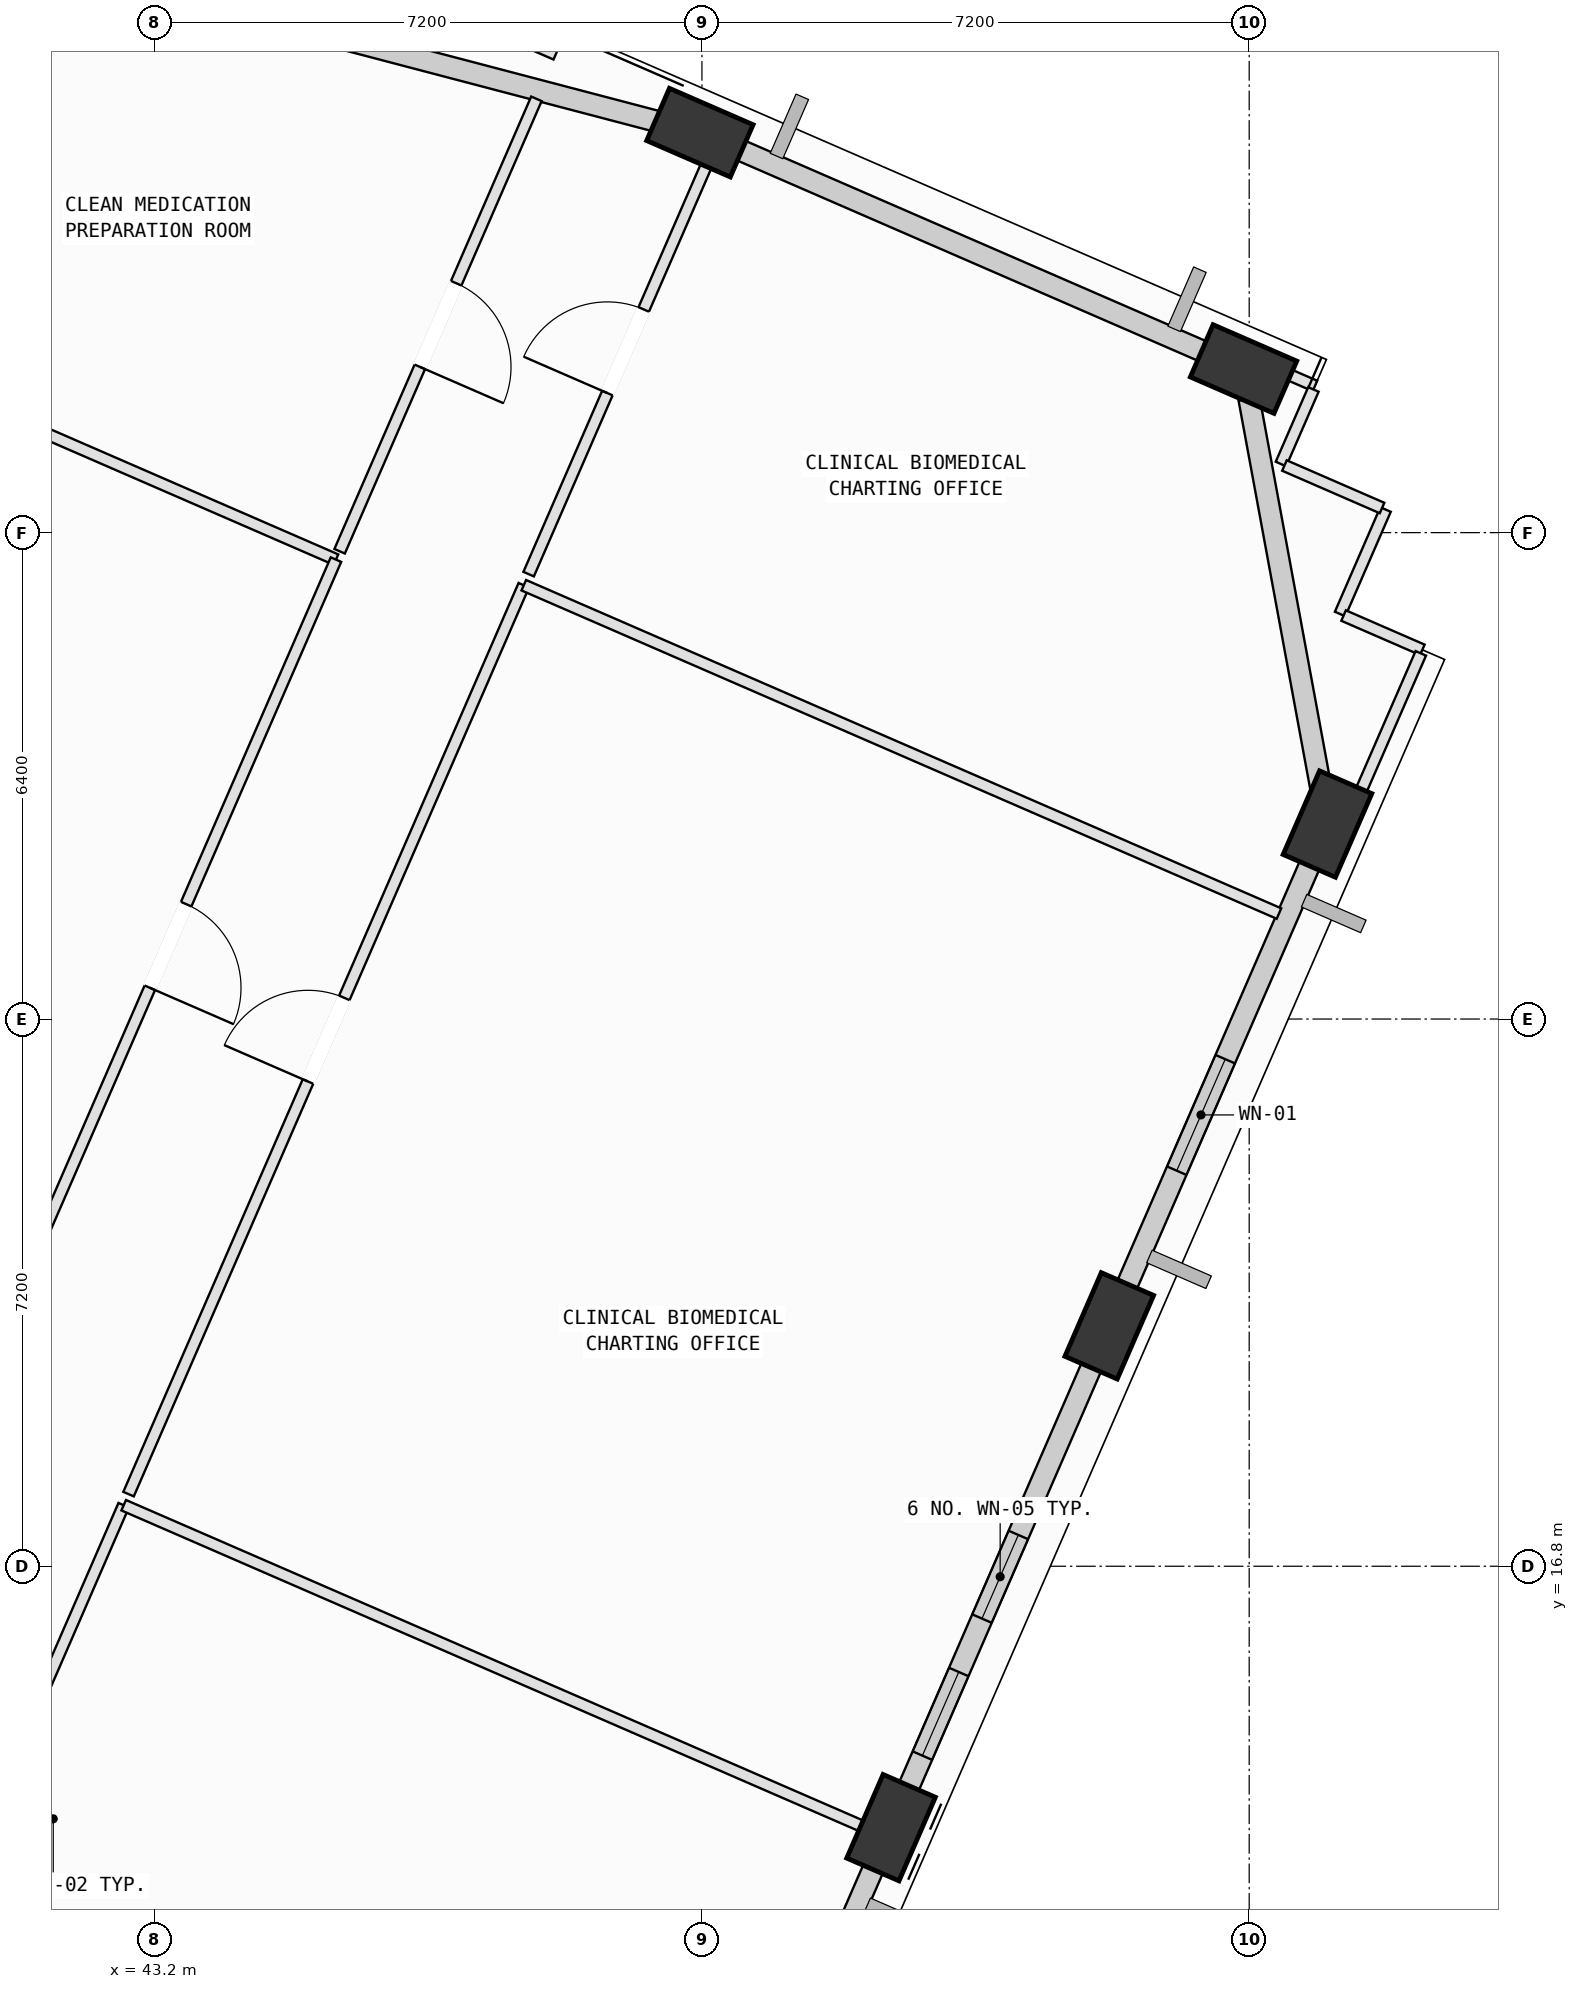
"""IFC4 building model, lengths in metres.
Left out: names, types, materials, properties, quantities, classifications, styles, units other than length and angle.
Written with IfcOpenShell. Run it as: python <this file> out.ifc"""

import sys

from ifc_helpers import new_model, si_unit, direction, frame, frame_2d, origin, origin_2d, place, context, subcontext, project, spatial, rectangle, extrude, element, fill, save


model = new_model("IFC4")
c1 = context("Model", 3, precision=1e-05, world=origin(), true_north=direction((0.0, 1.0)))
c2 = subcontext(c1, "Body", "Model", "MODEL_VIEW")
j1 = project(units=[si_unit("LENGTHUNIT", "METRE"), si_unit("PLANEANGLEUNIT", "RADIAN")], contexts=[c1])
p1 = place(None, origin())
s1 = spatial("IfcSite", under=j1, at=p1, CompositionType="ELEMENT")
p2 = place(p1, origin())
s2 = spatial("IfcBuilding", under=s1, at=p2, CompositionType="ELEMENT")
p3 = place(p2, frame((0.0, 0.0, 312.6)))
s3 = spatial("IfcBuildingStorey", under=s2, at=p3, CompositionType="ELEMENT", Elevation=312.6)
for number, where, z_axis, x_axis in (
    (1, (52.888, 13.36, 0.002), (0.0, 0.0, 1.0), (0.399, 0.917, 0.0)),
    (2, (55.759, 19.963, 0.002), (0.0, 0.0, 1.0), (0.399, 0.917, 0.0)),
    (3, (58.63, 26.566, 0.002), (0.0, 0.0, 1.0), (0.399, 0.917, 0.0)),
    (4, (57.526, 32.553, 0.002), (0.0, 0.0, 1.0), (-0.917, 0.399, 0.0)),
    (5, (50.373, 35.663, 0.002), (0.0, 0.0, 1.0), (-0.917, 0.399, 0.0)),
):
    element("IfcColumn", number, at=place(p3, frame(where, z_axis=z_axis, x_axis=x_axis)), inside=s3, PredefinedType="COLUMN", context=c2, shape_type="SweptSolid", body=[
        extrude(rectangle(XDim=1.2, YDim=0.75, at=origin_2d()), origin(), (0.0, 0.0, 1.0), 3.996),
    ])
p4 = place(p3, frame((52.729, 12.996, 0.0), z_axis=(0.0, 0.0, 1.0), x_axis=(-0.398744230651, -0.917062178112, 0.0)))
e6 = element("IfcWall", 6, at=p4, inside=s3, PredefinedType="SOLIDWALL", context=c2, shape_type="SweptSolid", body=[
    extrude(rectangle(XDim=6.405, YDim=0.28, at=frame_2d((3.203, 0.0))), origin(), (0.0, 0.0, 1.0), 3.265),
])
p5 = place(p4, frame((2.302, 0.0, 0.75)))
e7 = element("IfcOpeningElement", 7, at=p5, cuts=e6, PredefinedType="OPENING", context=c2, shape_type="SweptSolid", body=[
    extrude(rectangle(XDim=1.8, YDim=2.05, at=frame_2d((0.9, 1.025))), frame((0.0, 0.15, 0.0), z_axis=(0.0, -1.0, 0.0), x_axis=(1.0, 0.0, 0.0)), (0.0, 0.0, 1.0), 0.3),
])
p6 = place(p3, frame((55.601, 19.598, 0.0), z_axis=(0.0, 0.0, 1.0), x_axis=(-0.398744230651, -0.917062178112, 0.0)))
e8 = element("IfcWall", 8, at=p6, inside=s3, PredefinedType="SOLIDWALL", context=c2, shape_type="SweptSolid", body=[
    extrude(rectangle(XDim=6.405, YDim=0.28, at=frame_2d((3.203, 0.0))), origin(), (0.0, 0.0, 1.0), 3.265),
])
p7 = place(p6, frame((2.602, 0.0, 0.75)))
e9 = element("IfcOpeningElement", 9, at=p7, cuts=e8, PredefinedType="OPENING", context=c2, shape_type="SweptSolid", body=[
    extrude(rectangle(XDim=1.2, YDim=1.75, at=frame_2d((0.6, 0.875))), frame((0.0, 0.15, 0.0), z_axis=(0.0, -1.0, 0.0), x_axis=(1.0, 0.0, 0.0)), (0.0, 0.0, 1.0), 0.3),
])
p8 = place(p6, frame((4.569, 0.0, 0.75)))
e10 = element("IfcOpeningElement", 10, at=p8, cuts=e8, PredefinedType="OPENING", context=c2, shape_type="SweptSolid", body=[
    extrude(rectangle(XDim=1.2, YDim=1.75, at=frame_2d((0.6, 0.875))), frame((0.0, 0.15, 0.0), z_axis=(0.0, -1.0, 0.0), x_axis=(1.0, 0.0, 0.0)), (0.0, 0.0, 1.0), 0.3),
])
p9 = place(p3, frame((58.472, 26.201, 0.0), z_axis=(0.0, 0.0, 1.0), x_axis=(-0.398776286617, -0.917048239316, 0.0)))
e11 = element("IfcWall", 11, at=p9, inside=s3, PredefinedType="SOLIDWALL", context=c2, shape_type="SweptSolid", body=[
    extrude(rectangle(XDim=6.405, YDim=0.28, at=frame_2d((3.203, 0.0))), origin(), (0.0, 0.0, 1.0), 3.265),
])
p10 = place(p9, frame((2.976, 0.0, 0.75)))
e12 = element("IfcOpeningElement", 12, at=p10, cuts=e11, PredefinedType="OPENING", context=c2, shape_type="SweptSolid", body=[
    extrude(rectangle(XDim=1.6, YDim=1.95, at=frame_2d((0.8, 0.975))), frame((0.0, 0.15, 0.0), z_axis=(0.0, -1.0, 0.0), x_axis=(1.0, 0.0, 0.0)), (0.0, 0.0, 1.0), 0.3),
])
p11 = place(p3, frame((57.598, 32.162, 0.0), z_axis=(0.0, 0.0, 1.0), x_axis=(0.181421889976, -0.983405357845, 0.0)))
e13 = element("IfcWall", 13, at=p11, inside=s3, PredefinedType="SOLIDWALL", context=c2, shape_type="SweptSolid", body=[
    extrude(rectangle(XDim=5.293, YDim=0.28, at=frame_2d((2.646, 0.0))), origin(), (0.0, 0.0, 1.0), 3.265),
])
p12 = place(p3, frame((50.737, 35.504, 0.0), z_axis=(0.0, 0.0, 1.0), x_axis=(0.917057311373, -0.398755423359, 0.0)))
e14 = element("IfcWall", 14, at=p12, inside=s3, PredefinedType="SOLIDWALL", context=c2, shape_type="SweptSolid", body=[
    extrude(rectangle(XDim=7.005, YDim=0.28, at=frame_2d((3.502, 0.0))), origin(), (0.0, 0.0, 1.0), 3.265),
])
p13 = place(p3, frame((41.264, 38.054, 0.0), z_axis=(0.0, 0.0, 1.0), x_axis=(0.967228971308, -0.253905724755, 0.0)))
e15 = element("IfcWall", 15, at=p13, inside=s3, PredefinedType="SOLIDWALL", context=c2, shape_type="SweptSolid", body=[
    extrude(rectangle(XDim=9.02, YDim=0.28, at=frame_2d((4.51, 0.0))), origin(), (0.0, 0.0, 1.0), 3.265),
])
p14 = place(p3, frame((39.48, 9.984, 0.0), z_axis=(0.0, 0.0, 1.0), x_axis=(0.398659488131, 0.917099020021, 0.0)))
e16 = element("IfcWall", 16, at=p14, inside=s3, PredefinedType="PARTITIONING", context=c2, shape_type="SweptSolid", body=[
    extrude(rectangle(XDim=8.308, YDim=0.15, at=frame_2d((4.154, 0.0))), origin(), (0.0, 0.0, 1.0), 3.78),
])
p15 = place(p14, frame((3.554, 0.0, 0.0)))
e17 = element("IfcOpeningElement", 17, at=p15, cuts=e16, PredefinedType="OPENING", context=c2, shape_type="SweptSolid", body=[
    extrude(rectangle(XDim=1.2, YDim=2.15, at=frame_2d((0.6, 1.075))), frame((0.0, 0.085, 0.0), z_axis=(0.0, -1.0, 0.0), x_axis=(1.0, 0.0, 0.0)), (0.0, 0.0, 1.0), 0.17),
])
p16 = place(p3, frame((42.792, 17.603, 0.0), z_axis=(0.0, 0.0, 1.0), x_axis=(0.917063112739, -0.398742081117, 0.0)))
e18 = element("IfcWall", 18, at=p16, inside=s3, PredefinedType="PARTITIONING", context=c2, shape_type="SweptSolid", body=[
    extrude(rectangle(XDim=11.18, YDim=0.15, at=frame_2d((5.59, 0.0))), origin(), (0.0, 0.0, 1.0), 3.78),
])
p17 = place(p3, frame((42.856, 17.749, 0.0), z_axis=(0.0, 0.0, 1.0), x_axis=(0.398751440491, 0.917059043195, 0.0)))
e19 = element("IfcWall", 19, at=p17, inside=s3, PredefinedType="PARTITIONING", context=c2, shape_type="SweptSolid", body=[
    extrude(rectangle(XDim=13.041, YDim=0.15, at=frame_2d((6.52, 0.0))), origin(), (0.0, 0.0, 1.0), 3.78),
])
p18 = place(p17, frame((5.92, 0.0, 0.0)))
e20 = element("IfcOpeningElement", 20, at=p18, cuts=e19, PredefinedType="OPENING", context=c2, shape_type="SweptSolid", body=[
    extrude(rectangle(XDim=1.2, YDim=2.15, at=frame_2d((0.6, 1.075))), frame((0.0, 0.085, 0.0), z_axis=(0.0, -1.0, 0.0), x_axis=(1.0, 0.0, 0.0)), (0.0, 0.0, 1.0), 0.17),
])
p19 = place(p3, frame((48.056, 29.708, 0.0), z_axis=(0.0, 0.0, 1.0), x_axis=(0.917068265028, -0.398730231207, 0.0)))
e21 = element("IfcWall", 21, at=p19, inside=s3, PredefinedType="PARTITIONING", context=c2, shape_type="SweptSolid", body=[
    extrude(rectangle(XDim=10.834, YDim=0.15, at=frame_2d((5.417, 0.0))), origin(), (0.0, 0.0, 1.0), 3.78),
])
p20 = place(p3, frame((56.129, 20.236, 0.0), z_axis=(0.0, 0.0, 1.0), x_axis=(-0.398658726612, -0.91709935105, 0.0)))
e22 = element("IfcWall", 22, at=p20, inside=s3, PredefinedType="PARTITIONING", context=c2, shape_type="SweptSolid", body=[
    extrude(rectangle(XDim=0.795, YDim=0.15, at=frame_2d((0.397, 0.0))), origin(), (0.0, 0.0, 1.0), 3.265),
])
p21 = place(p3, frame((59.394, 30.704, 0.0), z_axis=(0.0, 0.0, 1.0), x_axis=(-0.398904712107, -0.916992383097, 0.0)))
e23 = element("IfcWall", 23, at=p21, inside=s3, PredefinedType="PARTITIONING", context=c2, shape_type="SweptSolid", body=[
    extrude(rectangle(XDim=1.5, YDim=0.15, at=frame_2d((0.75, 0.0))), origin(), (0.0, 0.0, 1.0), 3.78),
])
p22 = place(p3, frame((58.842, 29.309, 0.0), z_axis=(0.0, 0.0, 1.0), x_axis=(0.916815661373, -0.399310709926, 0.0)))
e24 = element("IfcWall", 24, at=p22, inside=s3, PredefinedType="PARTITIONING", context=c2, shape_type="SweptSolid", body=[
    extrude(rectangle(XDim=1.13, YDim=0.15, at=frame_2d((0.565, 0.0))), origin(), (0.0, 0.0, 1.0), 3.78),
])
p23 = place(p3, frame((59.858, 28.812, 0.0), z_axis=(0.0, 0.0, 1.0), x_axis=(-0.399092651862, -0.916910603728, 0.0)))
e25 = element("IfcWall", 25, at=p23, inside=s3, PredefinedType="PARTITIONING", context=c2, shape_type="SweptSolid", body=[
    extrude(rectangle(XDim=2.947, YDim=0.15, at=frame_2d((1.473, 0.0))), origin(), (0.0, 0.0, 1.0), 3.265),
])
p24 = place(p3, frame((48.12, 29.854, 0.0), z_axis=(0.0, 0.0, 1.0), x_axis=(0.398700984872, 0.917080980428, 0.0)))
e26 = element("IfcWall", 26, at=p24, inside=s3, PredefinedType="PARTITIONING", context=c2, shape_type="SweptSolid", body=[
    extrude(rectangle(XDim=6.395, YDim=0.15, at=frame_2d((3.198, 0.0))), origin(), (0.0, 0.0, 1.0), 2.765),
])
p25 = place(p24, frame((2.598, 0.0, 0.0)))
e27 = element("IfcOpeningElement", 27, at=p25, cuts=e26, PredefinedType="OPENING", context=c2, shape_type="SweptSolid", body=[
    extrude(rectangle(XDim=1.2, YDim=2.15, at=frame_2d((0.6, 1.075))), frame((0.0, 0.085, 0.0), z_axis=(0.0, -1.0, 0.0), x_axis=(1.0, 0.0, 0.0)), (0.0, 0.0, 1.0), 0.17),
])
p26 = place(p3, frame((57.229, 32.867, 0.0), z_axis=(0.0, 0.0, 1.0), x_axis=(0.917222637379, -0.398374991032, 0.0)))
e28 = element("IfcWall", 28, at=p26, inside=s3, PredefinedType="PARTITIONING", context=c2, shape_type="SweptSolid", body=[
    extrude(rectangle(XDim=1.348, YDim=0.15, at=frame_2d((0.674, 0.0))), origin(), (0.0, 0.0, 1.0), 3.265),
])
p27 = place(p3, frame((58.445, 32.284, 0.0), z_axis=(0.0, 0.0, 1.0), x_axis=(-0.39911825621, -0.916899458807, 0.0)))
e29 = element("IfcWall", 29, at=p27, inside=s3, PredefinedType="PARTITIONING", context=c2, shape_type="SweptSolid", body=[
    extrude(rectangle(XDim=1.07, YDim=0.15, at=frame_2d((0.535, 0.0))), origin(), (0.0, 0.0, 1.0), 3.78),
])
p28 = place(p3, frame((58.064, 31.283, 0.0), z_axis=(0.0, 0.0, 1.0), x_axis=(0.91691198731, -0.399089473085, 0.0)))
e30 = element("IfcWall", 30, at=p28, inside=s3, PredefinedType="PARTITIONING", context=c2, shape_type="SweptSolid", body=[
    extrude(rectangle(XDim=1.4, YDim=0.15, at=frame_2d((0.7, 0.0))), origin(), (0.0, 0.0, 1.0), 3.78),
])
p29 = place(p3, frame((38.767, 33.01, 0.0), z_axis=(0.0, 0.0, 1.0), x_axis=(0.917030896956, -0.398816165707, 0.0)))
e31 = element("IfcWall", 31, at=p29, inside=s3, PredefinedType="PARTITIONING", context=c2, shape_type="SweptSolid", body=[
    extrude(rectangle(XDim=7.435, YDim=0.15, at=frame_2d((3.717, 0.0))), origin(), (0.0, 0.0, 1.0), 3.78),
])
p30 = place(p3, frame((45.585, 30.045, 0.0), z_axis=(0.0, 0.0, 1.0), x_axis=(-0.398687458661, -0.91708686083, 0.0)))
e32 = element("IfcWall", 32, at=p30, inside=s3, PredefinedType="PARTITIONING", context=c2, shape_type="SweptSolid", body=[
    extrude(rectangle(XDim=11.086, YDim=0.15, at=frame_2d((5.543, 0.0))), origin(), (0.0, 0.0, 1.0), 2.765),
])
p31 = place(p30, frame((4.943, 0.0, 0.0)))
e33 = element("IfcOpeningElement", 33, at=p31, cuts=e32, PredefinedType="OPENING", context=c2, shape_type="SweptSolid", body=[
    extrude(rectangle(XDim=1.2, YDim=2.15, at=frame_2d((0.6, 1.075))), frame((0.0, 0.085, 0.0), z_axis=(0.0, -1.0, 0.0), x_axis=(1.0, 0.0, 0.0)), (0.0, 0.0, 1.0), 0.17),
])
p32 = place(p3, frame((42.424, 39.326, 0.0), z_axis=(0.0, 0.0, 1.0), x_axis=(0.917064175576, -0.3987396367, 0.0)))
e34 = element("IfcWall", 34, at=p32, inside=s3, PredefinedType="PARTITIONING", context=c2, shape_type="SweptSolid", body=[
    extrude(rectangle(XDim=6.6, YDim=0.15, at=frame_2d((3.3, 0.0))), origin(), (0.0, 0.0, 1.0), 3.78),
])
p33 = place(p3, frame((48.222, 36.108, 0.0), z_axis=(0.0, 0.0, 1.0), x_axis=(-0.398811373886, -0.9170329809, 0.0)))
e35 = element("IfcWall", 35, at=p33, inside=s3, PredefinedType="PARTITIONING", context=c2, shape_type="SweptSolid", body=[
    extrude(rectangle(XDim=6.491, YDim=0.15, at=frame_2d((3.246, 0.0))), origin(), (0.0, 0.0, 1.0), 2.765),
])
p34 = place(p33, frame((2.646, 0.0, 0.0)))
e36 = element("IfcOpeningElement", 36, at=p34, cuts=e35, PredefinedType="OPENING", context=c2, shape_type="SweptSolid", body=[
    extrude(rectangle(XDim=1.2, YDim=2.15, at=frame_2d((0.6, 1.075))), frame((0.0, 0.085, 0.0), z_axis=(0.0, -1.0, 0.0), x_axis=(1.0, 0.0, 0.0)), (0.0, 0.0, 1.0), 0.17),
])
p35 = place(p7, origin())
e37 = element("IfcWindow", 37, at=p35, inside=s3, PartitioningType="SINGLE_PANEL", PredefinedType="WINDOW", context=c2, shape_type="SweptSolid", body=[
    extrude(rectangle(XDim=1.2, YDim=1.75, at=frame_2d((0.6, 0.875))), frame((0.0, 0.03, 0.0), z_axis=(0.0, -1.0, 0.0), x_axis=(1.0, 0.0, 0.0)), (0.0, 0.0, 1.0), 0.06),
])
fill(e9, e37)
p36 = place(p8, origin())
e38 = element("IfcWindow", 38, at=p36, inside=s3, PartitioningType="SINGLE_PANEL", PredefinedType="WINDOW", context=c2, shape_type="SweptSolid", body=[
    extrude(rectangle(XDim=1.2, YDim=1.75, at=frame_2d((0.6, 0.875))), frame((0.0, 0.03, 0.0), z_axis=(0.0, -1.0, 0.0), x_axis=(1.0, 0.0, 0.0)), (0.0, 0.0, 1.0), 0.06),
])
fill(e10, e38)
p37 = place(p10, origin())
e39 = element("IfcWindow", 39, at=p37, inside=s3, PartitioningType="SINGLE_PANEL", PredefinedType="WINDOW", context=c2, shape_type="SweptSolid", body=[
    extrude(rectangle(XDim=1.6, YDim=1.95, at=frame_2d((0.8, 0.975))), frame((0.0, 0.03, 0.0), z_axis=(0.0, -1.0, 0.0), x_axis=(1.0, 0.0, 0.0)), (0.0, 0.0, 1.0), 0.06),
])
fill(e12, e39)
p38 = place(p18, origin())
e40 = element("IfcDoor", 40, at=p38, inside=s3, OperationType="SINGLE_SWING_LEFT", PredefinedType="DOOR", context=c2, shape_type="SweptSolid", body=[
    extrude(rectangle(XDim=1.2, YDim=2.15, at=frame_2d((0.6, 1.075))), frame((0.0, 0.025, 0.0), z_axis=(0.0, -1.0, 0.0), x_axis=(1.0, 0.0, 0.0)), (0.0, 0.0, 1.0), 0.05),
])
fill(e20, e40)
p39 = place(p25, origin())
e41 = element("IfcDoor", 41, at=p39, inside=s3, OperationType="SINGLE_SWING_LEFT", PredefinedType="DOOR", context=c2, shape_type="SweptSolid", body=[
    extrude(rectangle(XDim=1.2, YDim=2.15, at=frame_2d((0.6, 1.075))), frame((0.0, 0.025, 0.0), z_axis=(0.0, -1.0, 0.0), x_axis=(1.0, 0.0, 0.0)), (0.0, 0.0, 1.0), 0.05),
])
fill(e27, e41)
p40 = place(p31, origin())
e42 = element("IfcDoor", 42, at=p40, inside=s3, OperationType="SINGLE_SWING_RIGHT", PredefinedType="DOOR", context=c2, shape_type="SweptSolid", body=[
    extrude(rectangle(XDim=1.2, YDim=2.15, at=frame_2d((0.6, 1.075))), frame((0.0, 0.025, 0.0), z_axis=(0.0, -1.0, 0.0), x_axis=(1.0, 0.0, 0.0)), (0.0, 0.0, 1.0), 0.05),
])
fill(e33, e42)
p41 = place(p34, origin())
e43 = element("IfcDoor", 43, at=p41, inside=s3, OperationType="SINGLE_SWING_RIGHT", PredefinedType="DOOR", context=c2, shape_type="SweptSolid", body=[
    extrude(rectangle(XDim=1.2, YDim=2.15, at=frame_2d((0.6, 1.075))), frame((0.0, 0.025, 0.0), z_axis=(0.0, -1.0, 0.0), x_axis=(1.0, 0.0, 0.0)), (0.0, 0.0, 1.0), 0.05),
])
fill(e36, e43)
save(model, sys.argv[1])
